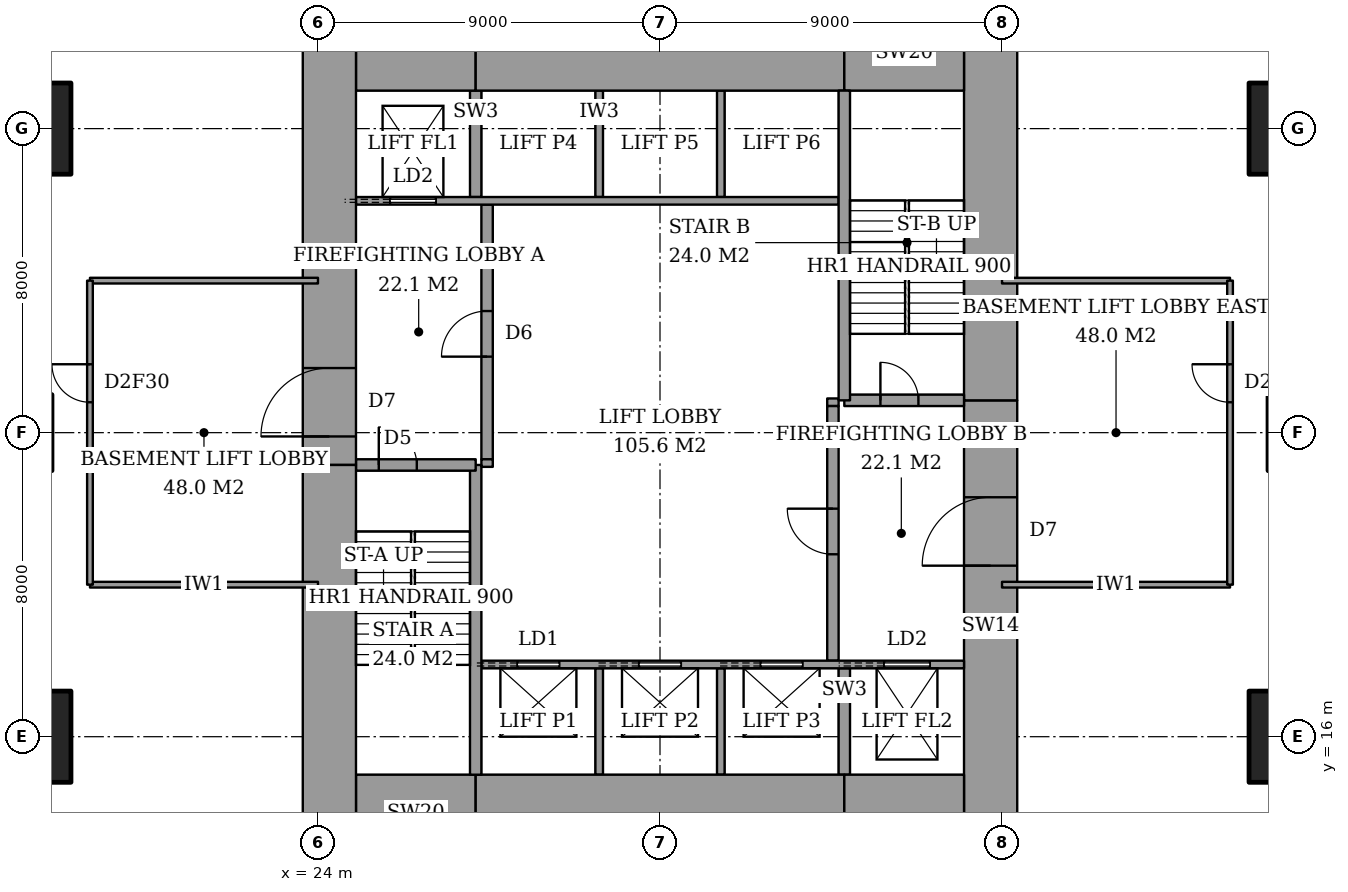
"""IFC4 building model, lengths in metres.
Left out: names, types, materials, properties, quantities, classifications, styles, units other than length and angle.
Written with IfcOpenShell. Run it as: python <this file> out.ifc"""

import sys

from ifc_helpers import new_model, si_unit, direction, frame, frame_2d, origin, origin_2d, place, context, subcontext, project, spatial, rectangle, extrude, element, fill, save


model = new_model("IFC4")
c1 = context("Model", 3, precision=1e-05, world=origin(), true_north=direction((0.0, 1.0)))
c2 = subcontext(c1, "Body", "Model", "MODEL_VIEW")
j1 = project(units=[si_unit("LENGTHUNIT", "METRE"), si_unit("PLANEANGLEUNIT", "RADIAN")], contexts=[c1])
p1 = place(None, origin())
s1 = spatial("IfcSite", under=j1, at=p1, CompositionType="ELEMENT")
p2 = place(p1, origin())
s2 = spatial("IfcBuilding", under=s1, at=p2, CompositionType="ELEMENT")
p3 = place(p2, frame((0.0, 0.0, -5.0)))
s3 = spatial("IfcBuildingStorey", under=s2, at=p3, CompositionType="ELEMENT", Elevation=-5.0)
for number, where, z_axis, x_axis in (
    (1, (16.0, 16.0, 0.0), (0.0, 0.0, 1.0), (1.0, 0.0, 0.0)),
    (2, (16.0, 32.0, 0.0), (0.0, 0.0, 1.0), (1.0, 0.0, 0.0)),
    (3, (50.0, 16.0, 0.0), (0.0, 0.0, 1.0), (1.0, 0.0, 0.0)),
    (4, (50.0, 32.0, 0.0), (0.0, 0.0, 1.0), (1.0, 0.0, 0.0)),
):
    element("IfcColumn", number, at=place(p3, frame(where, z_axis=z_axis, x_axis=x_axis)), inside=s3, PredefinedType="COLUMN", context=c2, shape_type="SweptSolid", body=[
        extrude(rectangle(XDim=3.0, YDim=2.4, at=origin_2d()), origin(), (0.0, 0.0, 1.0), 5.0),
    ])
p4 = place(p3, frame((25.0, 14.0, 0.0), z_axis=(0.0, 0.0, 1.0), x_axis=(1.0, 0.0, 0.0)))
e5 = element("IfcWall", 5, at=p4, inside=s3, PredefinedType="SHEAR", context=c2, shape_type="SweptSolid", body=[
    extrude(rectangle(XDim=3.15, YDim=2.0, at=frame_2d((1.575, 0.0))), origin(), (0.0, 0.0, 1.0), 5.0),
])
p5 = place(p3, frame((28.15, 14.0, 0.0), z_axis=(0.0, 0.0, 1.0), x_axis=(1.0, 0.0, 0.0)))
e6 = element("IfcWall", 6, at=p5, inside=s3, PredefinedType="SHEAR", context=c2, shape_type="SweptSolid", body=[
    extrude(rectangle(XDim=9.7, YDim=2.0, at=frame_2d((4.85, 0.0))), origin(), (0.0, 0.0, 1.0), 5.0),
])
for number, where, z_axis, x_axis in (
    (7, (37.85, 14.0, 0.0), (0.0, 0.0, 1.0), (1.0, 0.0, 0.0)),
    (8, (25.0, 34.0, 0.0), (0.0, 0.0, 1.0), (1.0, 0.0, 0.0)),
):
    element("IfcWall", number, at=place(p3, frame(where, z_axis=z_axis, x_axis=x_axis)), inside=s3, PredefinedType="SHEAR", context=c2, shape_type="SweptSolid", body=[
        extrude(rectangle(XDim=3.15, YDim=2.0, at=frame_2d((1.575, 0.0))), origin(), (0.0, 0.0, 1.0), 5.0),
    ])
p6 = place(p3, frame((28.15, 34.0, 0.0), z_axis=(0.0, 0.0, 1.0), x_axis=(1.0, 0.0, 0.0)))
e9 = element("IfcWall", 9, at=p6, inside=s3, PredefinedType="SHEAR", context=c2, shape_type="SweptSolid", body=[
    extrude(rectangle(XDim=9.7, YDim=2.0, at=frame_2d((4.85, 0.0))), origin(), (0.0, 0.0, 1.0), 5.0),
])
p7 = place(p3, frame((37.85, 34.0, 0.0), z_axis=(0.0, 0.0, 1.0), x_axis=(1.0, 0.0, 0.0)))
e10 = element("IfcWall", 10, at=p7, inside=s3, PredefinedType="SHEAR", context=c2, shape_type="SweptSolid", body=[
    extrude(rectangle(XDim=3.15, YDim=2.0, at=frame_2d((1.575, 0.0))), origin(), (0.0, 0.0, 1.0), 5.0),
])
p8 = place(p3, frame((24.3, 13.0, 0.0), z_axis=(0.0, 0.0, 1.0), x_axis=(0.0, 1.0, 0.0)))
e11 = element("IfcWall", 11, at=p8, inside=s3, PredefinedType="SHEAR", context=c2, shape_type="SweptSolid", body=[
    extrude(rectangle(XDim=10.15, YDim=1.4, at=frame_2d((5.075, 0.0))), origin(), (0.0, 0.0, 1.0), 5.0),
])
p9 = place(p3, frame((24.3, 23.15, 0.0), z_axis=(0.0, 0.0, 1.0), x_axis=(0.0, 1.0, 0.0)))
e12 = element("IfcWall", 12, at=p9, inside=s3, PredefinedType="SHEAR", context=c2, shape_type="SweptSolid", body=[
    extrude(rectangle(XDim=11.85, YDim=1.4, at=frame_2d((5.925, 0.0))), origin(), (0.0, 0.0, 1.0), 5.0),
])
p10 = place(p9, frame((0.75, 0.0, 0.0)))
e13 = element("IfcOpeningElement", 13, at=p10, cuts=e12, PredefinedType="OPENING", context=c2, shape_type="SweptSolid", body=[
    extrude(rectangle(XDim=1.8, YDim=2.4, at=frame_2d((0.9, 1.2))), frame((0.0, 0.71, 0.0), z_axis=(0.0, -1.0, 0.0), x_axis=(1.0, 0.0, 0.0)), (0.0, 0.0, 1.0), 1.42),
])
p11 = place(p3, frame((41.7, 13.0, 0.0), z_axis=(0.0, 0.0, 1.0), x_axis=(0.0, 1.0, 0.0)))
e14 = element("IfcWall", 14, at=p11, inside=s3, PredefinedType="SHEAR", context=c2, shape_type="SweptSolid", body=[
    extrude(rectangle(XDim=11.85, YDim=1.4, at=frame_2d((5.925, 0.0))), origin(), (0.0, 0.0, 1.0), 5.0),
])
p12 = place(p11, frame((7.5, 0.0, 0.0)))
e15 = element("IfcOpeningElement", 15, at=p12, cuts=e14, PredefinedType="OPENING", context=c2, shape_type="SweptSolid", body=[
    extrude(rectangle(XDim=1.8, YDim=2.4, at=frame_2d((0.9, 1.2))), frame((0.0, 0.71, 0.0), z_axis=(0.0, -1.0, 0.0), x_axis=(1.0, 0.0, 0.0)), (0.0, 0.0, 1.0), 1.42),
])
p13 = place(p3, frame((41.7, 24.85, 0.0), z_axis=(0.0, 0.0, 1.0), x_axis=(0.0, 1.0, 0.0)))
e16 = element("IfcWall", 16, at=p13, inside=s3, PredefinedType="SHEAR", context=c2, shape_type="SweptSolid", body=[
    extrude(rectangle(XDim=10.15, YDim=1.4, at=frame_2d((5.075, 0.0))), origin(), (0.0, 0.0, 1.0), 5.0),
])
p14 = place(p3, frame((28.15, 15.0, 0.0), z_axis=(0.0, 0.0, 1.0), x_axis=(0.0, 1.0, 0.0)))
e17 = element("IfcWall", 17, at=p14, inside=s3, PredefinedType="SHEAR", context=c2, shape_type="SweptSolid", body=[
    extrude(rectangle(XDim=8.15, YDim=0.3, at=frame_2d((4.075, 0.0))), origin(), (0.0, 0.0, 1.0), 5.0),
])
p15 = place(p3, frame((25.0, 23.15, 0.0), z_axis=(0.0, 0.0, 1.0), x_axis=(1.0, 0.0, 0.0)))
e18 = element("IfcWall", 18, at=p15, inside=s3, PredefinedType="SHEAR", context=c2, shape_type="SweptSolid", body=[
    extrude(rectangle(XDim=3.15, YDim=0.3, at=frame_2d((1.575, 0.0))), origin(), (0.0, 0.0, 1.0), 5.0),
])
p16 = place(p15, frame((0.6, 0.0, 0.0)))
e19 = element("IfcOpeningElement", 19, at=p16, cuts=e18, PredefinedType="OPENING", context=c2, shape_type="SweptSolid", body=[
    extrude(rectangle(XDim=1.0, YDim=2.1, at=frame_2d((0.5, 1.05))), frame((0.0, 0.16, 0.0), z_axis=(0.0, -1.0, 0.0), x_axis=(1.0, 0.0, 0.0)), (0.0, 0.0, 1.0), 0.32),
])
p17 = place(p3, frame((37.85, 24.85, 0.0), z_axis=(0.0, 0.0, 1.0), x_axis=(0.0, 1.0, 0.0)))
e20 = element("IfcWall", 20, at=p17, inside=s3, PredefinedType="SHEAR", context=c2, shape_type="SweptSolid", body=[
    extrude(rectangle(XDim=8.15, YDim=0.3, at=frame_2d((4.075, 0.0))), origin(), (0.0, 0.0, 1.0), 5.0),
])
p18 = place(p3, frame((37.85, 24.85, 0.0), z_axis=(0.0, 0.0, 1.0), x_axis=(1.0, 0.0, 0.0)))
e21 = element("IfcWall", 21, at=p18, inside=s3, PredefinedType="SHEAR", context=c2, shape_type="SweptSolid", body=[
    extrude(rectangle(XDim=3.15, YDim=0.3, at=frame_2d((1.575, 0.0))), origin(), (0.0, 0.0, 1.0), 5.0),
])
p19 = place(p18, frame((0.95, 0.0, 0.0)))
e22 = element("IfcOpeningElement", 22, at=p19, cuts=e21, PredefinedType="OPENING", context=c2, shape_type="SweptSolid", body=[
    extrude(rectangle(XDim=1.0, YDim=2.1, at=frame_2d((0.5, 1.05))), frame((0.0, 0.16, 0.0), z_axis=(0.0, -1.0, 0.0), x_axis=(1.0, 0.0, 0.0)), (0.0, 0.0, 1.0), 0.32),
])
p20 = place(p3, frame((28.45, 23.3, 0.0), z_axis=(0.0, 0.0, 1.0), x_axis=(0.0, 1.0, 0.0)))
e23 = element("IfcWall", 23, at=p20, inside=s3, PredefinedType="PARTITIONING", context=c2, shape_type="SweptSolid", body=[
    extrude(rectangle(XDim=6.7, YDim=0.3, at=frame_2d((3.35, 0.0))), origin(), (0.0, 0.0, 1.0), 5.0),
])
p21 = place(p20, frame((2.7, 0.0, 0.0)))
e24 = element("IfcOpeningElement", 24, at=p21, cuts=e23, PredefinedType="OPENING", context=c2, shape_type="SweptSolid", body=[
    extrude(rectangle(XDim=1.2, YDim=2.1, at=frame_2d((0.6, 1.05))), frame((0.0, 0.16, 0.0), z_axis=(0.0, -1.0, 0.0), x_axis=(1.0, 0.0, 0.0)), (0.0, 0.0, 1.0), 0.32),
])
p22 = place(p3, frame((37.55, 18.0, 0.0), z_axis=(0.0, 0.0, 1.0), x_axis=(0.0, 1.0, 0.0)))
e25 = element("IfcWall", 25, at=p22, inside=s3, PredefinedType="PARTITIONING", context=c2, shape_type="SweptSolid", body=[
    extrude(rectangle(XDim=6.7, YDim=0.3, at=frame_2d((3.35, 0.0))), origin(), (0.0, 0.0, 1.0), 5.0),
])
p23 = place(p22, frame((2.8, 0.0, 0.0)))
e26 = element("IfcOpeningElement", 26, at=p23, cuts=e25, PredefinedType="OPENING", context=c2, shape_type="SweptSolid", body=[
    extrude(rectangle(XDim=1.2, YDim=2.1, at=frame_2d((0.6, 1.05))), frame((0.0, 0.16, 0.0), z_axis=(0.0, -1.0, 0.0), x_axis=(1.0, 0.0, 0.0)), (0.0, 0.0, 1.0), 0.32),
])
for number, where, z_axis, x_axis in (
    (27, (18.0, 20.0, 0.0), (0.0, 0.0, 1.0), (1.0, 0.0, 0.0)),
    (28, (42.0, 20.0, 0.0), (0.0, 0.0, 1.0), (1.0, 0.0, 0.0)),
    (29, (18.0, 28.0, 0.0), (0.0, 0.0, 1.0), (1.0, 0.0, 0.0)),
    (30, (42.0, 28.0, 0.0), (0.0, 0.0, 1.0), (1.0, 0.0, 0.0)),
):
    element("IfcWall", number, at=place(p3, frame(where, z_axis=z_axis, x_axis=x_axis)), inside=s3, PredefinedType="PARTITIONING", context=c2, shape_type="SweptSolid", body=[
        extrude(rectangle(XDim=6.0, YDim=0.15, at=frame_2d((3.0, 0.0))), origin(), (0.0, 0.0, 1.0), 4.7),
    ])
p24 = place(p3, frame((18.0, 20.0, 0.0), z_axis=(0.0, 0.0, 1.0), x_axis=(0.0, 1.0, 0.0)))
e31 = element("IfcWall", 31, at=p24, inside=s3, PredefinedType="PARTITIONING", context=c2, shape_type="SweptSolid", body=[
    extrude(rectangle(XDim=8.0, YDim=0.15, at=frame_2d((4.0, 0.0))), origin(), (0.0, 0.0, 1.0), 4.7),
])
p25 = place(p24, frame((4.8, 0.0, 0.0)))
e32 = element("IfcOpeningElement", 32, at=p25, cuts=e31, PredefinedType="OPENING", context=c2, shape_type="SweptSolid", body=[
    extrude(rectangle(XDim=1.0, YDim=2.1, at=frame_2d((0.5, 1.05))), frame((0.0, 0.085, 0.0), z_axis=(0.0, -1.0, 0.0), x_axis=(1.0, 0.0, 0.0)), (0.0, 0.0, 1.0), 0.17),
])
p26 = place(p3, frame((48.0, 20.0, 0.0), z_axis=(0.0, 0.0, 1.0), x_axis=(0.0, 1.0, 0.0)))
e33 = element("IfcWall", 33, at=p26, inside=s3, PredefinedType="PARTITIONING", context=c2, shape_type="SweptSolid", body=[
    extrude(rectangle(XDim=8.0, YDim=0.15, at=frame_2d((4.0, 0.0))), origin(), (0.0, 0.0, 1.0), 4.7),
])
p27 = place(p26, frame((4.8, 0.0, 0.0)))
e34 = element("IfcOpeningElement", 34, at=p27, cuts=e33, PredefinedType="OPENING", context=c2, shape_type="SweptSolid", body=[
    extrude(rectangle(XDim=1.0, YDim=2.1, at=frame_2d((0.5, 1.05))), frame((0.0, 0.085, 0.0), z_axis=(0.0, -1.0, 0.0), x_axis=(1.0, 0.0, 0.0)), (0.0, 0.0, 1.0), 0.17),
])
p28 = place(p3, frame((28.3, 17.9, 0.0), z_axis=(0.0, 0.0, 1.0), x_axis=(1.0, 0.0, 0.0)))
e35 = element("IfcWall", 35, at=p28, inside=s3, PredefinedType="PARTITIONING", context=c2, shape_type="SweptSolid", body=[
    extrude(rectangle(XDim=12.7, YDim=0.2, at=frame_2d((6.35, 0.0))), origin(), (0.0, 0.0, 1.0), 5.0),
])
p29 = place(p28, frame((0.95, 0.0, 0.0)))
e36 = element("IfcOpeningElement", 36, at=p29, cuts=e35, PredefinedType="OPENING", context=c2, shape_type="SweptSolid", body=[
    extrude(rectangle(XDim=1.1, YDim=2.1, at=frame_2d((0.55, 1.05))), frame((0.0, 0.11, 0.0), z_axis=(0.0, -1.0, 0.0), x_axis=(1.0, 0.0, 0.0)), (0.0, 0.0, 1.0), 0.22),
])
p30 = place(p28, frame((4.15, 0.0, 0.0)))
e37 = element("IfcOpeningElement", 37, at=p30, cuts=e35, PredefinedType="OPENING", context=c2, shape_type="SweptSolid", body=[
    extrude(rectangle(XDim=1.1, YDim=2.1, at=frame_2d((0.55, 1.05))), frame((0.0, 0.11, 0.0), z_axis=(0.0, -1.0, 0.0), x_axis=(1.0, 0.0, 0.0)), (0.0, 0.0, 1.0), 0.22),
])
p31 = place(p28, frame((7.35, 0.0, 0.0)))
e38 = element("IfcOpeningElement", 38, at=p31, cuts=e35, PredefinedType="OPENING", context=c2, shape_type="SweptSolid", body=[
    extrude(rectangle(XDim=1.1, YDim=2.1, at=frame_2d((0.55, 1.05))), frame((0.0, 0.11, 0.0), z_axis=(0.0, -1.0, 0.0), x_axis=(1.0, 0.0, 0.0)), (0.0, 0.0, 1.0), 0.22),
])
p32 = place(p28, frame((10.6, 0.0, 0.0)))
e39 = element("IfcOpeningElement", 39, at=p32, cuts=e35, PredefinedType="OPENING", context=c2, shape_type="SweptSolid", body=[
    extrude(rectangle(XDim=1.2, YDim=2.1, at=frame_2d((0.6, 1.05))), frame((0.0, 0.11, 0.0), z_axis=(0.0, -1.0, 0.0), x_axis=(1.0, 0.0, 0.0)), (0.0, 0.0, 1.0), 0.22),
])
p33 = place(p3, frame((25.0, 30.1, 0.0), z_axis=(0.0, 0.0, 1.0), x_axis=(1.0, 0.0, 0.0)))
e40 = element("IfcWall", 40, at=p33, inside=s3, PredefinedType="PARTITIONING", context=c2, shape_type="SweptSolid", body=[
    extrude(rectangle(XDim=12.7, YDim=0.2, at=frame_2d((6.35, 0.0))), origin(), (0.0, 0.0, 1.0), 5.0),
])
p34 = place(p33, frame((0.9, 0.0, 0.0)))
e41 = element("IfcOpeningElement", 41, at=p34, cuts=e40, PredefinedType="OPENING", context=c2, shape_type="SweptSolid", body=[
    extrude(rectangle(XDim=1.2, YDim=2.1, at=frame_2d((0.6, 1.05))), frame((0.0, 0.11, 0.0), z_axis=(0.0, -1.0, 0.0), x_axis=(1.0, 0.0, 0.0)), (0.0, 0.0, 1.0), 0.22),
])
for number, where, z_axis, x_axis in (
    (42, (31.4, 15.0, 0.0), (0.0, 0.0, 1.0), (0.0, 1.0, 0.0)),
    (43, (34.6, 15.0, 0.0), (0.0, 0.0, 1.0), (0.0, 1.0, 0.0)),
):
    element("IfcWall", number, at=place(p3, frame(where, z_axis=z_axis, x_axis=x_axis)), inside=s3, PredefinedType="PARTITIONING", context=c2, shape_type="SweptSolid", body=[
        extrude(rectangle(XDim=2.8, YDim=0.2, at=frame_2d((1.4, 0.0))), origin(), (0.0, 0.0, 1.0), 5.0),
    ])
p35 = place(p3, frame((37.85, 15.0, 0.0), z_axis=(0.0, 0.0, 1.0), x_axis=(0.0, 1.0, 0.0)))
e44 = element("IfcWall", 44, at=p35, inside=s3, PredefinedType="SHEAR", context=c2, shape_type="SweptSolid", body=[
    extrude(rectangle(XDim=2.8, YDim=0.3, at=frame_2d((1.4, 0.0))), origin(), (0.0, 0.0, 1.0), 5.0),
])
for number, where, z_axis, x_axis in (
    (45, (31.4, 30.2, 0.0), (0.0, 0.0, 1.0), (0.0, 1.0, 0.0)),
    (46, (34.6, 30.2, 0.0), (0.0, 0.0, 1.0), (0.0, 1.0, 0.0)),
):
    element("IfcWall", number, at=place(p3, frame(where, z_axis=z_axis, x_axis=x_axis)), inside=s3, PredefinedType="PARTITIONING", context=c2, shape_type="SweptSolid", body=[
        extrude(rectangle(XDim=2.8, YDim=0.2, at=frame_2d((1.4, 0.0))), origin(), (0.0, 0.0, 1.0), 5.0),
    ])
p36 = place(p3, frame((28.15, 30.2, 0.0), z_axis=(0.0, 0.0, 1.0), x_axis=(0.0, 1.0, 0.0)))
e47 = element("IfcWall", 47, at=p36, inside=s3, PredefinedType="SHEAR", context=c2, shape_type="SweptSolid", body=[
    extrude(rectangle(XDim=2.8, YDim=0.3, at=frame_2d((1.4, 0.0))), origin(), (0.0, 0.0, 1.0), 5.0),
])
for number, where, z_axis, x_axis in (
    (48, (28.3, 23.2, 0.0), (0.0, 0.0, 1.0), (1.0, 0.0, 0.0)),
    (49, (37.4, 24.8, 0.0), (0.0, 0.0, 1.0), (1.0, 0.0, 0.0)),
):
    element("IfcWall", number, at=place(p3, frame(where, z_axis=z_axis, x_axis=x_axis)), inside=s3, PredefinedType="PARTITIONING", context=c2, shape_type="SweptSolid", body=[
        extrude(rectangle(XDim=0.3, YDim=0.2, at=frame_2d((0.15, 0.0))), origin(), (0.0, 0.0, 1.0), 5.0),
    ])
p37 = place(p25, origin())
e50 = element("IfcDoor", 50, at=p37, inside=s3, OperationType="SINGLE_SWING_LEFT", PredefinedType="DOOR", context=c2, shape_type="SweptSolid", body=[
    extrude(rectangle(XDim=1.0, YDim=2.1, at=frame_2d((0.5, 1.05))), frame((0.0, 0.025, 0.0), z_axis=(0.0, -1.0, 0.0), x_axis=(1.0, 0.0, 0.0)), (0.0, 0.0, 1.0), 0.05),
])
fill(e32, e50)
p38 = place(p27, origin())
e51 = element("IfcDoor", 51, at=p38, inside=s3, OperationType="SINGLE_SWING_LEFT", PredefinedType="DOOR", context=c2, shape_type="SweptSolid", body=[
    extrude(rectangle(XDim=1.0, YDim=2.1, at=frame_2d((0.5, 1.05))), frame((0.0, 0.025, 0.0), z_axis=(0.0, -1.0, 0.0), x_axis=(1.0, 0.0, 0.0)), (0.0, 0.0, 1.0), 0.05),
])
fill(e34, e51)
p39 = place(p16, origin())
e52 = element("IfcDoor", 52, at=p39, inside=s3, OperationType="SINGLE_SWING_RIGHT", PredefinedType="DOOR", context=c2, shape_type="SweptSolid", body=[
    extrude(rectangle(XDim=1.0, YDim=2.1, at=frame_2d((0.5, 1.05))), frame((0.0, 0.025, 0.0), z_axis=(0.0, -1.0, 0.0), x_axis=(1.0, 0.0, 0.0)), (0.0, 0.0, 1.0), 0.05),
])
fill(e19, e52)
p40 = place(p19, origin())
e53 = element("IfcDoor", 53, at=p40, inside=s3, OperationType="SINGLE_SWING_RIGHT", PredefinedType="DOOR", context=c2, shape_type="SweptSolid", body=[
    extrude(rectangle(XDim=1.0, YDim=2.1, at=frame_2d((0.5, 1.05))), frame((0.0, 0.025, 0.0), z_axis=(0.0, -1.0, 0.0), x_axis=(1.0, 0.0, 0.0)), (0.0, 0.0, 1.0), 0.05),
])
fill(e22, e53)
p41 = place(p21, origin())
e54 = element("IfcDoor", 54, at=p41, inside=s3, OperationType="SINGLE_SWING_RIGHT", PredefinedType="DOOR", context=c2, shape_type="SweptSolid", body=[
    extrude(rectangle(XDim=1.2, YDim=2.1, at=frame_2d((0.6, 1.05))), frame((0.0, 0.025, 0.0), z_axis=(0.0, -1.0, 0.0), x_axis=(1.0, 0.0, 0.0)), (0.0, 0.0, 1.0), 0.05),
])
fill(e24, e54)
p42 = place(p23, origin())
e55 = element("IfcDoor", 55, at=p42, inside=s3, OperationType="SINGLE_SWING_LEFT", PredefinedType="DOOR", context=c2, shape_type="SweptSolid", body=[
    extrude(rectangle(XDim=1.2, YDim=2.1, at=frame_2d((0.6, 1.05))), frame((0.0, 0.025, 0.0), z_axis=(0.0, -1.0, 0.0), x_axis=(1.0, 0.0, 0.0)), (0.0, 0.0, 1.0), 0.05),
])
fill(e26, e55)
p43 = place(p10, origin())
e56 = element("IfcDoor", 56, at=p43, inside=s3, OperationType="DOUBLE_DOOR_DOUBLE_SWING", PredefinedType="DOOR", context=c2, shape_type="SweptSolid", body=[
    extrude(rectangle(XDim=1.8, YDim=2.4, at=frame_2d((0.9, 1.2))), frame((0.0, 0.025, 0.0), z_axis=(0.0, -1.0, 0.0), x_axis=(1.0, 0.0, 0.0)), (0.0, 0.0, 1.0), 0.05),
])
fill(e13, e56)
p44 = place(p12, origin())
e57 = element("IfcDoor", 57, at=p44, inside=s3, OperationType="DOUBLE_DOOR_DOUBLE_SWING", PredefinedType="DOOR", context=c2, shape_type="SweptSolid", body=[
    extrude(rectangle(XDim=1.8, YDim=2.4, at=frame_2d((0.9, 1.2))), frame((0.0, 0.025, 0.0), z_axis=(0.0, -1.0, 0.0), x_axis=(1.0, 0.0, 0.0)), (0.0, 0.0, 1.0), 0.05),
])
fill(e15, e57)
p45 = place(p29, origin())
e58 = element("IfcDoor", 58, at=p45, inside=s3, OperationType="SLIDING_TO_LEFT", PredefinedType="DOOR", context=c2, shape_type="SweptSolid", body=[
    extrude(rectangle(XDim=1.1, YDim=2.1, at=frame_2d((0.55, 1.05))), frame((0.0, 0.025, 0.0), z_axis=(0.0, -1.0, 0.0), x_axis=(1.0, 0.0, 0.0)), (0.0, 0.0, 1.0), 0.05),
])
fill(e36, e58)
p46 = place(p30, origin())
e59 = element("IfcDoor", 59, at=p46, inside=s3, OperationType="SLIDING_TO_LEFT", PredefinedType="DOOR", context=c2, shape_type="SweptSolid", body=[
    extrude(rectangle(XDim=1.1, YDim=2.1, at=frame_2d((0.55, 1.05))), frame((0.0, 0.025, 0.0), z_axis=(0.0, -1.0, 0.0), x_axis=(1.0, 0.0, 0.0)), (0.0, 0.0, 1.0), 0.05),
])
fill(e37, e59)
p47 = place(p31, origin())
e60 = element("IfcDoor", 60, at=p47, inside=s3, OperationType="SLIDING_TO_LEFT", PredefinedType="DOOR", context=c2, shape_type="SweptSolid", body=[
    extrude(rectangle(XDim=1.1, YDim=2.1, at=frame_2d((0.55, 1.05))), frame((0.0, 0.025, 0.0), z_axis=(0.0, -1.0, 0.0), x_axis=(1.0, 0.0, 0.0)), (0.0, 0.0, 1.0), 0.05),
])
fill(e38, e60)
p48 = place(p34, origin())
e61 = element("IfcDoor", 61, at=p48, inside=s3, OperationType="SLIDING_TO_LEFT", PredefinedType="DOOR", context=c2, shape_type="SweptSolid", body=[
    extrude(rectangle(XDim=1.2, YDim=2.1, at=frame_2d((0.6, 1.05))), frame((0.0, 0.025, 0.0), z_axis=(0.0, -1.0, 0.0), x_axis=(1.0, 0.0, 0.0)), (0.0, 0.0, 1.0), 0.05),
])
fill(e41, e61)
p49 = place(p32, origin())
e62 = element("IfcDoor", 62, at=p49, inside=s3, OperationType="SLIDING_TO_LEFT", PredefinedType="DOOR", context=c2, shape_type="SweptSolid", body=[
    extrude(rectangle(XDim=1.2, YDim=2.1, at=frame_2d((0.6, 1.05))), frame((0.0, 0.025, 0.0), z_axis=(0.0, -1.0, 0.0), x_axis=(1.0, 0.0, 0.0)), (0.0, 0.0, 1.0), 0.05),
])
fill(e39, e62)
save(model, sys.argv[1])
